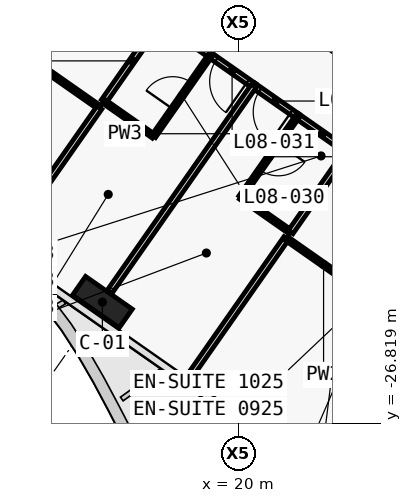
"""IFC4 building model, lengths in metres.
Left out: names, types, materials, properties, quantities, classifications, styles, units other than length and angle.
Written with IfcOpenShell. Run it as: python <this file> out.ifc"""

import sys

from ifc_helpers import new_model, si_unit, direction, frame, frame_2d, origin, origin_2d, place, context, subcontext, project, spatial, rectangle, extrude, element, fill, save


model = new_model("IFC4")
c1 = context("Model", 3, precision=1e-05, world=origin(), true_north=direction((0.0, 1.0)))
c2 = subcontext(c1, "Body", "Model", "MODEL_VIEW")
j1 = project(units=[si_unit("LENGTHUNIT", "METRE"), si_unit("PLANEANGLEUNIT", "RADIAN")], contexts=[c1])
p1 = place(None, origin())
s1 = spatial("IfcSite", under=j1, at=p1, CompositionType="ELEMENT")
p2 = place(p1, origin())
s2 = spatial("IfcBuilding", under=s1, at=p2, CompositionType="ELEMENT")
p3 = place(p2, frame((0.0, 0.0, 54.5)))
s3 = spatial("IfcBuildingStorey", under=s2, at=p3, CompositionType="ELEMENT", Elevation=54.5)
p4 = place(p3, frame((16.41, -23.637, 0.0), z_axis=(0.0, 0.0, 1.0), x_axis=(0.819152044289, -0.573576436351, 0.0)))
e1 = element("IfcColumn", 1, at=p4, inside=s3, PredefinedType="COLUMN", context=c2, shape_type="SweptSolid", body=[
    extrude(rectangle(XDim=1.5, YDim=0.6, at=origin_2d()), origin(), (0.0, 0.0, 1.0), 3.6),
])
p5 = place(p3, frame((22.284, -16.824, 0.0), z_axis=(0.0, 0.0, 1.0), x_axis=(0.819176640776, -0.573541307325, 0.0)))
e2 = element("IfcWall", 2, at=p5, inside=s3, PredefinedType="PARTITIONING", context=c2, shape_type="SweptSolid", body=[
    extrude(rectangle(XDim=2.698, YDim=0.15, at=frame_2d((1.349, 0.0))), origin(), (0.0, 0.0, 1.0), 3.32),
])
p6 = place(p5, frame((0.396, 0.0, 0.0)))
e3 = element("IfcOpeningElement", 3, at=p6, cuts=e2, PredefinedType="OPENING", context=c2, shape_type="SweptSolid", body=[
    extrude(rectangle(XDim=1.0, YDim=2.1, at=frame_2d((0.5, 1.05))), frame((0.0, 0.085, 0.0), z_axis=(0.0, -1.0, 0.0), x_axis=(1.0, 0.0, 0.0)), (0.0, 0.0, 1.0), 0.17),
])
p7 = place(p3, frame((20.398, -17.945, 0.0), z_axis=(0.0, 0.0, 1.0), x_axis=(-0.819060210533, 0.573707566205, 0.0)))
e4 = element("IfcWall", 4, at=p7, inside=s3, PredefinedType="PARTITIONING", context=c2, shape_type="SweptSolid", body=[
    extrude(rectangle(XDim=1.403, YDim=0.15, at=frame_2d((0.702, 0.0))), origin(), (0.0, 0.0, 1.0), 2.6),
])
p8 = place(p7, frame((0.202, 0.0, 0.0)))
e5 = element("IfcOpeningElement", 5, at=p8, cuts=e4, PredefinedType="OPENING", context=c2, shape_type="SweptSolid", body=[
    extrude(rectangle(XDim=1.0, YDim=2.1, at=frame_2d((0.5, 1.05))), frame((0.0, 0.085, 0.0), z_axis=(0.0, -1.0, 0.0), x_axis=(1.0, 0.0, 0.0)), (0.0, 0.0, 1.0), 0.17),
])
p9 = place(p3, frame((19.251, -17.142, 0.0), z_axis=(0.0, 0.0, 1.0), x_axis=(-0.819189013667, 0.573523634986, 0.0)))
e6 = element("IfcWall", 6, at=p9, inside=s3, PredefinedType="PARTITIONING", context=c2, shape_type="SweptSolid", body=[
    extrude(rectangle(XDim=1.604, YDim=0.15, at=frame_2d((0.802, 0.0))), origin(), (0.0, 0.0, 1.0), 3.32),
])
p10 = place(p3, frame((21.544, -18.748, 0.0), z_axis=(0.0, 0.0, 1.0), x_axis=(-0.81914197737, 0.573590813132, 0.0)))
e7 = element("IfcWall", 7, at=p10, inside=s3, PredefinedType="PARTITIONING", context=c2, shape_type="SweptSolid", body=[
    extrude(rectangle(XDim=1.403, YDim=0.15, at=frame_2d((0.701, 0.0))), origin(), (0.0, 0.0, 1.0), 2.6),
])
p11 = place(p10, frame((0.201, 0.0, 0.0)))
e8 = element("IfcOpeningElement", 8, at=p11, cuts=e7, PredefinedType="OPENING", context=c2, shape_type="SweptSolid", body=[
    extrude(rectangle(XDim=1.0, YDim=2.1, at=frame_2d((0.5, 1.05))), frame((0.0, 0.085, 0.0), z_axis=(0.0, -1.0, 0.0), x_axis=(1.0, 0.0, 0.0)), (0.0, 0.0, 1.0), 0.17),
])
p12 = place(p3, frame((22.855, -19.666, 0.0), z_axis=(0.0, 0.0, 1.0), x_axis=(-0.819117502046, 0.573625764625, 0.0)))
e9 = element("IfcWall", 9, at=p12, inside=s3, PredefinedType="PARTITIONING", context=c2, shape_type="SweptSolid", body=[
    extrude(rectangle(XDim=1.604, YDim=0.15, at=frame_2d((0.802, 0.0))), origin(), (0.0, 0.0, 1.0), 3.32),
])
p13 = place(p3, frame((15.972, -14.846, 0.0), z_axis=(0.0, 0.0, 1.0), x_axis=(-0.573550118428, -0.819170471667, 0.0)))
e10 = element("IfcWall", 10, at=p13, inside=s3, PredefinedType="PARTITIONING", context=c2, shape_type="SweptSolid", body=[
    extrude(rectangle(XDim=2.8, YDim=0.12, at=frame_2d((1.4, 0.0))), origin(), (0.0, 0.0, 1.0), 3.32),
])
p14 = place(p13, frame((0.975, 0.0, 0.0)))
e11 = element("IfcOpeningElement", 11, at=p14, cuts=e10, PredefinedType="OPENING", context=c2, shape_type="SweptSolid", body=[
    extrude(rectangle(XDim=0.85, YDim=2.05, at=frame_2d((0.425, 1.025))), frame((0.0, 0.07, 0.0), z_axis=(0.0, -1.0, 0.0), x_axis=(1.0, 0.0, 0.0)), (0.0, 0.0, 1.0), 0.14),
])
p15 = place(p3, frame((14.366, -17.141, 0.0), z_axis=(0.0, 0.0, 1.0), x_axis=(0.819155442668, -0.573571582932, 0.0)))
e12 = element("IfcWall", 12, at=p15, inside=s3, PredefinedType="PARTITIONING", context=c2, shape_type="SweptSolid", body=[
    extrude(rectangle(XDim=2.4, YDim=0.12, at=frame_2d((1.2, 0.0))), origin(), (0.0, 0.0, 1.0), 3.32),
])
p16 = place(p3, frame((16.332, -18.518, 0.0), z_axis=(0.0, 0.0, 1.0), x_axis=(-0.573564311442, -0.819160534108, 0.0)))
e13 = element("IfcWall", 13, at=p16, inside=s3, PredefinedType="PARTITIONING", context=c2, shape_type="SweptSolid", body=[
    extrude(rectangle(XDim=4.499, YDim=0.15, at=frame_2d((2.25, 0.0))), origin(), (0.0, 0.0, 1.0), 2.5),
])
p17 = place(p3, frame((17.939, -16.223, 0.0), z_axis=(0.0, 0.0, 1.0), x_axis=(-0.573588285102, -0.819143747577, 0.0)))
e14 = element("IfcWall", 14, at=p17, inside=s3, PredefinedType="PARTITIONING", context=c2, shape_type="SweptSolid", body=[
    extrude(rectangle(XDim=2.602, YDim=0.15, at=frame_2d((1.301, 0.0))), origin(), (0.0, 0.0, 1.0), 3.32),
])
p18 = place(p3, frame((16.447, -18.354, 0.0), z_axis=(0.0, 0.0, 1.0), x_axis=(0.819253425856, -0.573431621227, 0.0)))
e15 = element("IfcWall", 15, at=p18, inside=s3, PredefinedType="PARTITIONING", context=c2, shape_type="SweptSolid", body=[
    extrude(rectangle(XDim=1.6, YDim=0.12, at=frame_2d((0.8, 0.0))), origin(), (0.0, 0.0, 1.0), 3.32),
])
p19 = place(p3, frame((17.759, -19.271, 0.0), z_axis=(0.0, 0.0, 1.0), x_axis=(0.573600972199, 0.819134863556, 0.0)))
e16 = element("IfcWall", 16, at=p19, inside=s3, PredefinedType="PARTITIONING", context=c2, shape_type="SweptSolid", body=[
    extrude(rectangle(XDim=2.6, YDim=0.12, at=frame_2d((1.3, 0.0))), origin(), (0.0, 0.0, 1.0), 3.32),
])
p20 = place(p19, frame((0.875, 0.0, 0.0)))
e17 = element("IfcOpeningElement", 17, at=p20, cuts=e16, PredefinedType="OPENING", context=c2, shape_type="SweptSolid", body=[
    extrude(rectangle(XDim=0.85, YDim=2.05, at=frame_2d((0.425, 1.025))), frame((0.0, 0.07, 0.0), z_axis=(0.0, -1.0, 0.0), x_axis=(1.0, 0.0, 0.0)), (0.0, 0.0, 1.0), 0.14),
])
p21 = place(p3, frame((20.396, -17.944, 0.0), z_axis=(0.0, 0.0, 1.0), x_axis=(-0.57359826181, -0.819136761505, 0.0)))
e18 = element("IfcWall", 18, at=p21, inside=s3, PredefinedType="PARTITIONING", context=c2, shape_type="SweptSolid", body=[
    extrude(rectangle(XDim=6.63, YDim=0.15, at=frame_2d((3.315, 0.0))), origin(), (0.0, 0.0, 1.0), 2.6),
])
p22 = place(p3, frame((21.542, -18.747, 0.0), z_axis=(0.0, 0.0, 1.0), x_axis=(-0.573645091666, -0.819103967032, 0.0)))
e19 = element("IfcWall", 19, at=p22, inside=s3, PredefinedType="PARTITIONING", context=c2, shape_type="SweptSolid", body=[
    extrude(rectangle(XDim=2.6, YDim=0.12, at=frame_2d((1.3, 0.0))), origin(), (0.0, 0.0, 1.0), 3.32),
])
p23 = place(p22, frame((0.875, 0.0, 0.0)))
e20 = element("IfcOpeningElement", 20, at=p23, cuts=e19, PredefinedType="OPENING", context=c2, shape_type="SweptSolid", body=[
    extrude(rectangle(XDim=0.85, YDim=2.05, at=frame_2d((0.425, 1.025))), frame((0.0, 0.07, 0.0), z_axis=(0.0, -1.0, 0.0), x_axis=(1.0, 0.0, 0.0)), (0.0, 0.0, 1.0), 0.14),
])
p24 = place(p3, frame((20.051, -20.878, 0.0), z_axis=(0.0, 0.0, 1.0), x_axis=(0.81918174131, -0.573534022273, 0.0)))
e21 = element("IfcWall", 21, at=p24, inside=s3, PredefinedType="PARTITIONING", context=c2, shape_type="SweptSolid", body=[
    extrude(rectangle(XDim=1.6, YDim=0.12, at=frame_2d((0.8, 0.0))), origin(), (0.0, 0.0, 1.0), 3.32),
])
p25 = place(p3, frame((21.248, -21.958, 0.0), z_axis=(0.0, 0.0, 1.0), x_axis=(-0.573556991349, -0.819165659482, 0.0)))
e22 = element("IfcWall", 22, at=p25, inside=s3, PredefinedType="PARTITIONING", context=c2, shape_type="SweptSolid", body=[
    extrude(rectangle(XDim=4.501, YDim=0.15, at=frame_2d((2.25, 0.0))), origin(), (0.0, 0.0, 1.0), 2.5),
])
p26 = place(p3, frame((22.854, -19.665, 0.0), z_axis=(0.0, 0.0, 1.0), x_axis=(-0.573582085028, -0.819148089014, 0.0)))
e23 = element("IfcWall", 23, at=p26, inside=s3, PredefinedType="PARTITIONING", context=c2, shape_type="SweptSolid", body=[
    extrude(rectangle(XDim=2.6, YDim=0.15, at=frame_2d((1.3, 0.0))), origin(), (0.0, 0.0, 1.0), 3.32),
])
p27 = place(p3, frame((21.247, -21.959, 0.0), z_axis=(0.0, 0.0, 1.0), x_axis=(0.819155442668, -0.573571582932, 0.0)))
e24 = element("IfcWall", 24, at=p27, inside=s3, PredefinedType="PARTITIONING", context=c2, shape_type="SweptSolid", body=[
    extrude(rectangle(XDim=2.4, YDim=0.12, at=frame_2d((1.2, 0.0))), origin(), (0.0, 0.0, 1.0), 3.32),
])
p28 = place(p20, origin())
e25 = element("IfcDoor", 25, at=p28, inside=s3, OperationType="SINGLE_SWING_LEFT", PredefinedType="DOOR", context=c2, shape_type="SweptSolid", body=[
    extrude(rectangle(XDim=0.85, YDim=2.05, at=frame_2d((0.425, 1.025))), frame((0.0, 0.025, 0.0), z_axis=(0.0, -1.0, 0.0), x_axis=(1.0, 0.0, 0.0)), (0.0, 0.0, 1.0), 0.05),
])
fill(e17, e25)
p29 = place(p8, origin())
e26 = element("IfcDoor", 26, at=p29, inside=s3, OperationType="SINGLE_SWING_RIGHT", PredefinedType="DOOR", context=c2, shape_type="SweptSolid", body=[
    extrude(rectangle(XDim=1.0, YDim=2.1, at=frame_2d((0.5, 1.05))), frame((0.0, 0.025, 0.0), z_axis=(0.0, -1.0, 0.0), x_axis=(1.0, 0.0, 0.0)), (0.0, 0.0, 1.0), 0.05),
])
fill(e5, e26)
p30 = place(p23, origin())
e27 = element("IfcDoor", 27, at=p30, inside=s3, OperationType="SINGLE_SWING_LEFT", PredefinedType="DOOR", context=c2, shape_type="SweptSolid", body=[
    extrude(rectangle(XDim=0.85, YDim=2.05, at=frame_2d((0.425, 1.025))), frame((0.0, 0.025, 0.0), z_axis=(0.0, -1.0, 0.0), x_axis=(1.0, 0.0, 0.0)), (0.0, 0.0, 1.0), 0.05),
])
fill(e20, e27)
p31 = place(p11, origin())
e28 = element("IfcDoor", 28, at=p31, inside=s3, OperationType="SINGLE_SWING_RIGHT", PredefinedType="DOOR", context=c2, shape_type="SweptSolid", body=[
    extrude(rectangle(XDim=1.0, YDim=2.1, at=frame_2d((0.5, 1.05))), frame((0.0, 0.025, 0.0), z_axis=(0.0, -1.0, 0.0), x_axis=(1.0, 0.0, 0.0)), (0.0, 0.0, 1.0), 0.05),
])
fill(e8, e28)
save(model, sys.argv[1])
